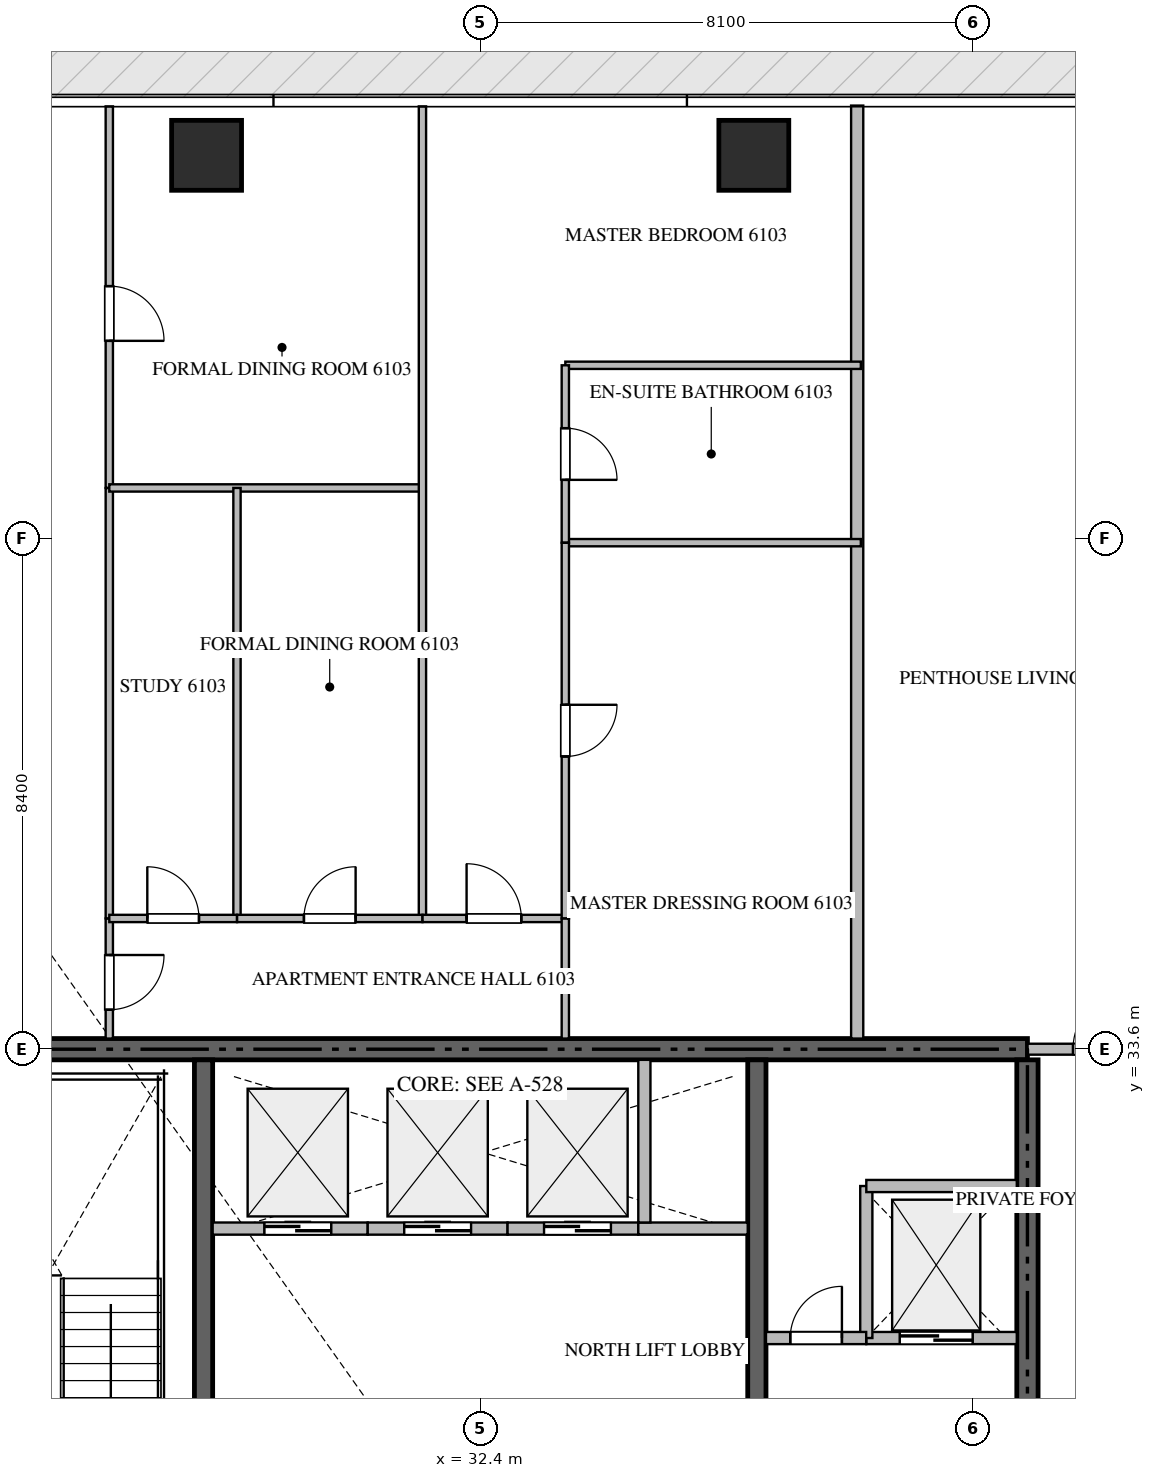
"""IFC4 building model, lengths in metres.
Left out: names, types, materials, properties, quantities, classifications, styles, units other than length and angle.
Written with IfcOpenShell. Run it as: python <this file> out.ifc"""

import sys

from ifc_helpers import new_model, si_unit, direction, frame, frame_2d, origin, origin_2d, place, context, subcontext, project, spatial, rectangle, extrude, source, transform, mapped, element, fill, save


model = new_model("IFC4")
c1 = context("Model", 3, precision=1e-05, world=origin(), true_north=direction((0.0, 1.0)))
c2 = subcontext(c1, "Body", "Model", "MODEL_VIEW")
j1 = project(units=[si_unit("LENGTHUNIT", "METRE"), si_unit("PLANEANGLEUNIT", "RADIAN")], contexts=[c1])
p1 = place(None, origin())
s1 = spatial("IfcSite", under=j1, at=p1, CompositionType="ELEMENT")
p2 = place(p1, origin())
s2 = spatial("IfcBuilding", under=s1, at=p2, CompositionType="ELEMENT")
p3 = place(p2, frame((0.0, 0.0, 245.1)))
s3 = spatial("IfcBuildingStorey", under=s2, at=p3, CompositionType="ELEMENT", Elevation=245.1)
p4 = place(p3, frame((41.4, 33.6, -0.26), z_axis=(0.0, 0.0, 1.0), x_axis=(-1.0, 0.0, 0.0)))
e1 = element("IfcWall", 1, at=p4, inside=s3, PredefinedType="SHEAR", context=c2, shape_type="SweptSolid", body=[
    extrude(rectangle(XDim=18.0, YDim=0.35, at=frame_2d((9.0, 0.0))), origin(), (0.0, 0.0, 1.0), 3.848),
])
p5 = place(p3, frame((41.4, 27.75, -0.26), z_axis=(0.0, 0.0, 1.0), x_axis=(0.0, 1.0, 0.0)))
e2 = element("IfcWall", 2, at=p5, inside=s3, PredefinedType="SHEAR", context=c2, shape_type="SweptSolid", body=[
    extrude(rectangle(XDim=5.675, YDim=0.35, at=frame_2d((2.837, 0.0))), origin(), (0.0, 0.0, 1.0), 3.848),
])
p6 = place(p3, frame((27.85, 23.55, -0.26), z_axis=(0.0, 0.0, 1.0), x_axis=(0.0, 1.0, 0.0)))
e3 = element("IfcWall", 3, at=p6, inside=s3, PredefinedType="SHEAR", context=c2, shape_type="SweptSolid", body=[
    extrude(rectangle(XDim=9.875, YDim=0.3, at=frame_2d((4.938, 0.0))), origin(), (0.0, 0.0, 1.0), 3.848),
])
p7 = place(p3, frame((36.95, 27.05, -0.26), z_axis=(0.0, 0.0, 1.0), x_axis=(0.0, 1.0, 0.0)))
e4 = element("IfcWall", 4, at=p7, inside=s3, PredefinedType="SHEAR", context=c2, shape_type="SweptSolid", body=[
    extrude(rectangle(XDim=6.375, YDim=0.3, at=frame_2d((3.188, 0.0))), origin(), (0.0, 0.0, 1.0), 3.848),
])
m1 = source(origin(), c2, "Body", "SweptSolid", [
    extrude(rectangle(XDim=1.15, YDim=1.15, at=origin_2d()), origin(), (0.0, 0.0, 1.0), 3.85),
])
for number, where, z_axis, x_axis in (
    (5, (27.9, 48.3, -0.26), (0.0, 0.0, 1.0), (1.0, 0.0, 0.0)),
    (6, (36.9, 48.3, -0.26), (0.0, 0.0, 1.0), (1.0, 0.0, 0.0)),
):
    element("IfcColumn", number, at=place(p3, frame(where, z_axis=z_axis, x_axis=x_axis)), inside=s3, PredefinedType="COLUMN", context=c2, shape_type="MappedRepresentation", body=[
        mapped(m1, transform((0.0, 0.0, 0.0), scale=1.0)),
    ])
p8 = place(p3, frame((38.75, 28.85, 0.0), z_axis=(0.0, 0.0, 1.0), x_axis=(1.0, 0.0, 0.0)))
e7 = element("IfcWall", 7, at=p8, inside=s3, PredefinedType="STANDARD", context=c2, shape_type="SweptSolid", body=[
    extrude(rectangle(XDim=2.475, YDim=0.2, at=frame_2d((1.238, 0.0))), origin(), (0.0, 0.0, 1.0), 3.59),
])
p9 = place(p8, frame((0.55, 0.0, 0.0)))
e8 = element("IfcOpeningElement", 8, at=p9, cuts=e7, PredefinedType="OPENING", context=c2, shape_type="SweptSolid", body=[
    extrude(rectangle(XDim=1.2, YDim=2.2, at=frame_2d((0.6, 1.1))), frame((0.0, 0.11, 0.0), z_axis=(0.0, -1.0, 0.0), x_axis=(1.0, 0.0, 0.0)), (0.0, 0.0, 1.0), 0.22),
])
p10 = place(p3, frame((28.0, 30.65, 0.0), z_axis=(0.0, 0.0, 1.0), x_axis=(1.0, 0.0, 0.0)))
e9 = element("IfcWall", 9, at=p10, inside=s3, PredefinedType="STANDARD", context=c2, shape_type="SweptSolid", body=[
    extrude(rectangle(XDim=2.55, YDim=0.2, at=frame_2d((1.275, 0.0))), origin(), (0.0, 0.0, 1.0), 3.59),
])
p11 = place(p10, frame((0.85, 0.0, 0.0)))
e10 = element("IfcOpeningElement", 10, at=p11, cuts=e9, PredefinedType="OPENING", context=c2, shape_type="SweptSolid", body=[
    extrude(rectangle(XDim=1.1, YDim=2.2, at=frame_2d((0.55, 1.1))), frame((0.0, 0.11, 0.0), z_axis=(0.0, -1.0, 0.0), x_axis=(1.0, 0.0, 0.0)), (0.0, 0.0, 1.0), 0.22),
])
p12 = place(p3, frame((30.55, 30.65, 0.0), z_axis=(0.0, 0.0, 1.0), x_axis=(1.0, 0.0, 0.0)))
e11 = element("IfcWall", 11, at=p12, inside=s3, PredefinedType="STANDARD", context=c2, shape_type="SweptSolid", body=[
    extrude(rectangle(XDim=2.3, YDim=0.2, at=frame_2d((1.15, 0.0))), origin(), (0.0, 0.0, 1.0), 3.59),
])
p13 = place(p12, frame((0.6, 0.0, 0.0)))
e12 = element("IfcOpeningElement", 12, at=p13, cuts=e11, PredefinedType="OPENING", context=c2, shape_type="SweptSolid", body=[
    extrude(rectangle(XDim=1.1, YDim=2.2, at=frame_2d((0.55, 1.1))), frame((0.0, 0.11, 0.0), z_axis=(0.0, -1.0, 0.0), x_axis=(1.0, 0.0, 0.0)), (0.0, 0.0, 1.0), 0.22),
])
p14 = place(p3, frame((32.85, 30.65, 0.0), z_axis=(0.0, 0.0, 1.0), x_axis=(1.0, 0.0, 0.0)))
e13 = element("IfcWall", 13, at=p14, inside=s3, PredefinedType="STANDARD", context=c2, shape_type="SweptSolid", body=[
    extrude(rectangle(XDim=2.15, YDim=0.2, at=frame_2d((1.075, 0.0))), origin(), (0.0, 0.0, 1.0), 3.59),
])
p15 = place(p14, frame((0.6, 0.0, 0.0)))
e14 = element("IfcOpeningElement", 14, at=p15, cuts=e13, PredefinedType="OPENING", context=c2, shape_type="SweptSolid", body=[
    extrude(rectangle(XDim=1.1, YDim=2.2, at=frame_2d((0.55, 1.1))), frame((0.0, 0.11, 0.0), z_axis=(0.0, -1.0, 0.0), x_axis=(1.0, 0.0, 0.0)), (0.0, 0.0, 1.0), 0.22),
])
p16 = place(p3, frame((35.0, 30.65, 0.0), z_axis=(0.0, 0.0, 1.0), x_axis=(1.0, 0.0, 0.0)))
e15 = element("IfcWall", 15, at=p16, inside=s3, PredefinedType="STANDARD", context=c2, shape_type="SweptSolid", body=[
    extrude(rectangle(XDim=1.8, YDim=0.2, at=frame_2d((0.9, 0.0))), origin(), (0.0, 0.0, 1.0), 3.59),
])
p17 = place(p3, frame((35.1, 30.75, 0.0), z_axis=(0.0, 0.0, 1.0), x_axis=(0.0, 1.0, 0.0)))
e16 = element("IfcWall", 16, at=p17, inside=s3, PredefinedType="STANDARD", context=c2, shape_type="SweptSolid", body=[
    extrude(rectangle(XDim=2.675, YDim=0.2, at=frame_2d((1.337, 0.0))), origin(), (0.0, 0.0, 1.0), 3.59),
])
p18 = place(p3, frame((38.75, 28.85, 0.0), z_axis=(0.0, 0.0, 1.0), x_axis=(0.0, 1.0, 0.0)))
e17 = element("IfcWall", 17, at=p18, inside=s3, PredefinedType="STANDARD", context=c2, shape_type="SweptSolid", body=[
    extrude(rectangle(XDim=2.5, YDim=0.2, at=frame_2d((1.25, 0.0))), origin(), (0.0, 0.0, 1.0), 3.59),
])
p19 = place(p3, frame((38.75, 31.35, 0.0), z_axis=(0.0, 0.0, 1.0), x_axis=(1.0, 0.0, 0.0)))
e18 = element("IfcWall", 18, at=p19, inside=s3, PredefinedType="STANDARD", context=c2, shape_type="SweptSolid", body=[
    extrude(rectangle(XDim=2.475, YDim=0.2, at=frame_2d((1.238, 0.0))), origin(), (0.0, 0.0, 1.0), 3.59),
])
p20 = place(p3, frame((37.1, 28.85, 0.0), z_axis=(0.0, 0.0, 1.0), x_axis=(1.0, 0.0, 0.0)))
e19 = element("IfcWall", 19, at=p20, inside=s3, PredefinedType="STANDARD", context=c2, shape_type="SweptSolid", body=[
    extrude(rectangle(XDim=1.648, YDim=0.2, at=frame_2d((0.824, 0.0))), origin(), (0.0, 0.0, 1.0), 3.59),
])
p21 = place(p20, frame((0.399, 0.0, 0.0)))
e20 = element("IfcOpeningElement", 20, at=p21, cuts=e19, PredefinedType="OPENING", context=c2, shape_type="SweptSolid", body=[
    extrude(rectangle(XDim=0.85, YDim=2.1, at=frame_2d((0.425, 1.05))), frame((0.0, 0.11, 0.0), z_axis=(0.0, -1.0, 0.0), x_axis=(1.0, 0.0, 0.0)), (0.0, 0.0, 1.0), 0.22),
])
p22 = place(p3, frame((38.6, 33.775, 0.0), z_axis=(0.0, 0.0, 1.0), x_axis=(0.0, 1.0, 0.0)))
e21 = element("IfcWall", 21, at=p22, inside=s3, PredefinedType="PARTITIONING", context=c2, shape_type="SweptSolid", body=[
    extrude(rectangle(XDim=15.343, YDim=0.2, at=frame_2d((7.671, 0.0))), origin(), (0.0, 0.0, 1.0), 3.59),
])
p23 = place(p3, frame((41.402, 33.6, 0.0), z_axis=(0.0, 0.0, 1.0), x_axis=(1.0, 0.0, 0.0)))
e22 = element("IfcWall", 22, at=p23, inside=s3, PredefinedType="PARTITIONING", context=c2, shape_type="SweptSolid", body=[
    extrude(rectangle(XDim=2.496, YDim=0.18, at=frame_2d((1.248, 0.0))), origin(), (0.0, 0.0, 1.0), 3.59),
])
p24 = place(p23, frame((0.748, 0.0, 0.0)))
e23 = element("IfcOpeningElement", 23, at=p24, cuts=e22, PredefinedType="OPENING", context=c2, shape_type="SweptSolid", body=[
    extrude(rectangle(XDim=1.0, YDim=2.15, at=frame_2d((0.5, 1.075))), frame((0.0, 0.1, 0.0), z_axis=(0.0, -1.0, 0.0), x_axis=(1.0, 0.0, 0.0)), (0.0, 0.0, 1.0), 0.2),
])
p25 = place(p3, frame((26.3, 35.75, 0.0), z_axis=(0.0, 0.0, 1.0), x_axis=(0.0, -1.0, 0.0)))
e24 = element("IfcWall", 24, at=p25, inside=s3, PredefinedType="PARTITIONING", context=c2, shape_type="SweptSolid", body=[
    extrude(rectangle(XDim=1.975, YDim=0.12, at=frame_2d((0.988, 0.0))), origin(), (0.0, 0.0, 1.0), 3.59),
])
p26 = place(p25, frame((0.601, 0.0, 0.0)))
e25 = element("IfcOpeningElement", 25, at=p26, cuts=e24, PredefinedType="OPENING", context=c2, shape_type="SweptSolid", body=[
    extrude(rectangle(XDim=0.9, YDim=2.1, at=frame_2d((0.45, 1.05))), frame((0.0, 0.07, 0.0), z_axis=(0.0, -1.0, 0.0), x_axis=(1.0, 0.0, 0.0)), (0.0, 0.0, 1.0), 0.14),
])
p27 = place(p3, frame((26.3, 49.105, 0.0), z_axis=(0.0, 0.0, 1.0), x_axis=(0.0, -1.0, 0.0)))
e26 = element("IfcWall", 26, at=p27, inside=s3, PredefinedType="PARTITIONING", context=c2, shape_type="SweptSolid", body=[
    extrude(rectangle(XDim=6.275, YDim=0.12, at=frame_2d((3.137, 0.0))), origin(), (0.0, 0.0, 1.0), 3.59),
])
p28 = place(p27, frame((2.956, 0.0, 0.0)))
e27 = element("IfcOpeningElement", 27, at=p28, cuts=e26, PredefinedType="OPENING", context=c2, shape_type="SweptSolid", body=[
    extrude(rectangle(XDim=0.9, YDim=2.1, at=frame_2d((0.45, 1.05))), frame((0.0, 0.07, 0.0), z_axis=(0.0, -1.0, 0.0), x_axis=(1.0, 0.0, 0.0)), (0.0, 0.0, 1.0), 0.14),
])
p29 = place(p3, frame((26.3, 42.828, 0.0), z_axis=(0.0, 0.0, 1.0), x_axis=(0.0, -1.0, 0.0)))
e28 = element("IfcWall", 28, at=p29, inside=s3, PredefinedType="PARTITIONING", context=c2, shape_type="SweptSolid", body=[
    extrude(rectangle(XDim=7.076, YDim=0.12, at=frame_2d((3.538, 0.0))), origin(), (0.0, 0.0, 1.0), 3.59),
])
p30 = place(p3, frame((26.3, 42.83, 0.0), z_axis=(0.0, 0.0, 1.0), x_axis=(1.0, 0.0, 0.0)))
e29 = element("IfcWall", 29, at=p30, inside=s3, PredefinedType="PARTITIONING", context=c2, shape_type="SweptSolid", body=[
    extrude(rectangle(XDim=5.15, YDim=0.12, at=frame_2d((2.575, 0.0))), origin(), (0.0, 0.0, 1.0), 3.59),
])
p31 = place(p3, frame((31.45, 49.105, 0.0), z_axis=(0.0, 0.0, 1.0), x_axis=(0.0, -1.0, 0.0)))
e30 = element("IfcWall", 30, at=p31, inside=s3, PredefinedType="PARTITIONING", context=c2, shape_type="SweptSolid", body=[
    extrude(rectangle(XDim=13.355, YDim=0.12, at=frame_2d((6.677, 0.0))), origin(), (0.0, 0.0, 1.0), 3.59),
])
p32 = place(p3, frame((28.4, 42.83, 0.0), z_axis=(0.0, 0.0, 1.0), x_axis=(0.0, -1.0, 0.0)))
e31 = element("IfcWall", 31, at=p32, inside=s3, PredefinedType="PARTITIONING", context=c2, shape_type="SweptSolid", body=[
    extrude(rectangle(XDim=7.08, YDim=0.12, at=frame_2d((3.54, 0.0))), origin(), (0.0, 0.0, 1.0), 3.59),
])
p33 = place(p3, frame((26.3, 35.75, 0.0), z_axis=(0.0, 0.0, 1.0), x_axis=(1.0, 0.0, 0.0)))
e32 = element("IfcWall", 32, at=p33, inside=s3, PredefinedType="PARTITIONING", context=c2, shape_type="SweptSolid", body=[
    extrude(rectangle(XDim=2.1, YDim=0.12, at=frame_2d((1.05, 0.0))), origin(), (0.0, 0.0, 1.0), 3.59),
])
p34 = place(p33, frame((0.625, 0.0, 0.0)))
e33 = element("IfcOpeningElement", 33, at=p34, cuts=e32, PredefinedType="OPENING", context=c2, shape_type="SweptSolid", body=[
    extrude(rectangle(XDim=0.85, YDim=2.1, at=frame_2d((0.425, 1.05))), frame((0.0, 0.07, 0.0), z_axis=(0.0, -1.0, 0.0), x_axis=(1.0, 0.0, 0.0)), (0.0, 0.0, 1.0), 0.14),
])
p35 = place(p3, frame((28.402, 35.75, 0.0), z_axis=(0.0, 0.0, 1.0), x_axis=(1.0, 0.0, 0.0)))
e34 = element("IfcWall", 34, at=p35, inside=s3, PredefinedType="PARTITIONING", context=c2, shape_type="SweptSolid", body=[
    extrude(rectangle(XDim=3.048, YDim=0.12, at=frame_2d((1.524, 0.0))), origin(), (0.0, 0.0, 1.0), 3.59),
])
p36 = place(p35, frame((1.099, 0.0, 0.0)))
e35 = element("IfcOpeningElement", 35, at=p36, cuts=e34, PredefinedType="OPENING", context=c2, shape_type="SweptSolid", body=[
    extrude(rectangle(XDim=0.85, YDim=2.1, at=frame_2d((0.425, 1.05))), frame((0.0, 0.07, 0.0), z_axis=(0.0, -1.0, 0.0), x_axis=(1.0, 0.0, 0.0)), (0.0, 0.0, 1.0), 0.14),
])
p37 = place(p3, frame((31.452, 35.75, 0.0), z_axis=(0.0, 0.0, 1.0), x_axis=(1.0, 0.0, 0.0)))
e36 = element("IfcWall", 36, at=p37, inside=s3, PredefinedType="PARTITIONING", context=c2, shape_type="SweptSolid", body=[
    extrude(rectangle(XDim=2.348, YDim=0.12, at=frame_2d((1.174, 0.0))), origin(), (0.0, 0.0, 1.0), 3.59),
])
p38 = place(p37, frame((0.724, 0.0, 0.0)))
e37 = element("IfcOpeningElement", 37, at=p38, cuts=e36, PredefinedType="OPENING", context=c2, shape_type="SweptSolid", body=[
    extrude(rectangle(XDim=0.9, YDim=2.1, at=frame_2d((0.45, 1.05))), frame((0.0, 0.07, 0.0), z_axis=(0.0, -1.0, 0.0), x_axis=(1.0, 0.0, 0.0)), (0.0, 0.0, 1.0), 0.14),
])
for number, where, z_axis, x_axis in (
    (38, (33.8, 44.847, 0.0), (0.0, 0.0, 1.0), (1.0, 0.0, 0.0)),
    (39, (33.8, 41.93, 0.0), (0.0, 0.0, 1.0), (1.0, 0.0, 0.0)),
):
    element("IfcWall", number, at=place(p3, frame(where, z_axis=z_axis, x_axis=x_axis)), inside=s3, PredefinedType="PARTITIONING", context=c2, shape_type="SweptSolid", body=[
        extrude(rectangle(XDim=4.86, YDim=0.12, at=frame_2d((2.43, 0.0))), origin(), (0.0, 0.0, 1.0), 3.59),
    ])
p39 = place(p3, frame((33.8, 44.847, 0.0), z_axis=(0.0, 0.0, 1.0), x_axis=(0.0, -1.0, 0.0)))
e40 = element("IfcWall", 40, at=p39, inside=s3, PredefinedType="PARTITIONING", context=c2, shape_type="SweptSolid", body=[
    extrude(rectangle(XDim=2.917, YDim=0.12, at=frame_2d((1.458, 0.0))), origin(), (0.0, 0.0, 1.0), 3.59),
])
p40 = place(p39, frame((1.034, 0.0, 0.0)))
e41 = element("IfcOpeningElement", 41, at=p40, cuts=e40, PredefinedType="OPENING", context=c2, shape_type="SweptSolid", body=[
    extrude(rectangle(XDim=0.85, YDim=2.1, at=frame_2d((0.425, 1.05))), frame((0.0, 0.07, 0.0), z_axis=(0.0, -1.0, 0.0), x_axis=(1.0, 0.0, 0.0)), (0.0, 0.0, 1.0), 0.14),
])
p41 = place(p3, frame((33.8, 41.928, 0.0), z_axis=(0.0, 0.0, 1.0), x_axis=(0.0, -1.0, 0.0)))
e42 = element("IfcWall", 42, at=p41, inside=s3, PredefinedType="PARTITIONING", context=c2, shape_type="SweptSolid", body=[
    extrude(rectangle(XDim=6.178, YDim=0.12, at=frame_2d((3.089, 0.0))), origin(), (0.0, 0.0, 1.0), 3.59),
])
p42 = place(p41, frame((2.664, 0.0, 0.0)))
e43 = element("IfcOpeningElement", 43, at=p42, cuts=e42, PredefinedType="OPENING", context=c2, shape_type="SweptSolid", body=[
    extrude(rectangle(XDim=0.85, YDim=2.1, at=frame_2d((0.425, 1.05))), frame((0.0, 0.07, 0.0), z_axis=(0.0, -1.0, 0.0), x_axis=(1.0, 0.0, 0.0)), (0.0, 0.0, 1.0), 0.14),
])
p43 = place(p3, frame((33.8, 35.748, 0.0), z_axis=(0.0, 0.0, 1.0), x_axis=(0.0, -1.0, 0.0)))
e44 = element("IfcWall", 44, at=p43, inside=s3, PredefinedType="PARTITIONING", context=c2, shape_type="SweptSolid", body=[
    extrude(rectangle(XDim=1.973, YDim=0.12, at=frame_2d((0.987, 0.0))), origin(), (0.0, 0.0, 1.0), 3.59),
])
m2 = source(origin(), c2, "Body", "SweptSolid", [
    extrude(rectangle(XDim=1.2, YDim=2.2, at=frame_2d((0.6, 1.1))), frame((0.0, 0.025, 0.0), z_axis=(0.0, -1.0, 0.0), x_axis=(1.0, 0.0, 0.0)), (0.0, 0.0, 1.0), 0.05),
])
p44 = place(p9, origin())
e45 = element("IfcDoor", 45, at=p44, inside=s3, OperationType="DOUBLE_DOOR_SLIDING", PredefinedType="DOOR", context=c2, shape_type="MappedRepresentation", body=[
    mapped(m2, transform((0.0, 0.0, 0.0), scale=1.0)),
])
fill(e8, e45)
m3 = source(origin(), c2, "Body", "SweptSolid", [
    extrude(rectangle(XDim=1.1, YDim=2.2, at=frame_2d((0.55, 1.1))), frame((0.0, 0.025, 0.0), z_axis=(0.0, -1.0, 0.0), x_axis=(1.0, 0.0, 0.0)), (0.0, 0.0, 1.0), 0.05),
])
p45 = place(p11, origin())
e46 = element("IfcDoor", 46, at=p45, inside=s3, OperationType="DOUBLE_DOOR_SLIDING", PredefinedType="DOOR", context=c2, shape_type="MappedRepresentation", body=[
    mapped(m3, transform((0.0, 0.0, 0.0), scale=1.0)),
])
fill(e10, e46)
p46 = place(p13, origin())
e47 = element("IfcDoor", 47, at=p46, inside=s3, OperationType="DOUBLE_DOOR_SLIDING", PredefinedType="DOOR", context=c2, shape_type="MappedRepresentation", body=[
    mapped(m3, transform((0.0, 0.0, 0.0), scale=1.0)),
])
fill(e12, e47)
p47 = place(p15, origin())
e48 = element("IfcDoor", 48, at=p47, inside=s3, OperationType="DOUBLE_DOOR_SLIDING", PredefinedType="DOOR", context=c2, shape_type="MappedRepresentation", body=[
    mapped(m3, transform((0.0, 0.0, 0.0), scale=1.0)),
])
fill(e14, e48)
m4 = source(origin(), c2, "Body", "SweptSolid", [
    extrude(rectangle(XDim=0.85, YDim=2.1, at=frame_2d((0.425, 1.05))), frame((0.0, 0.025, 0.0), z_axis=(0.0, -1.0, 0.0), x_axis=(1.0, 0.0, 0.0)), (0.0, 0.0, 1.0), 0.05),
])
p48 = place(p21, origin())
e49 = element("IfcDoor", 49, at=p48, inside=s3, OperationType="SINGLE_SWING_RIGHT", PredefinedType="DOOR", context=c2, shape_type="MappedRepresentation", body=[
    mapped(m4, transform((0.0, 0.0, 0.0), scale=1.0)),
])
fill(e20, e49)
m5 = source(origin(), c2, "Body", "SweptSolid", [
    extrude(rectangle(XDim=1.0, YDim=2.15, at=frame_2d((0.5, 1.075))), frame((0.0, 0.025, 0.0), z_axis=(0.0, -1.0, 0.0), x_axis=(1.0, 0.0, 0.0)), (0.0, 0.0, 1.0), 0.05),
])
p49 = place(p24, origin())
e50 = element("IfcDoor", 50, at=p49, inside=s3, OperationType="SINGLE_SWING_RIGHT", PredefinedType="DOOR", context=c2, shape_type="MappedRepresentation", body=[
    mapped(m5, transform((0.0, 0.0, 0.0), scale=1.0)),
])
fill(e23, e50)
m6 = source(origin(), c2, "Body", "SweptSolid", [
    extrude(rectangle(XDim=0.9, YDim=2.1, at=frame_2d((0.45, 1.05))), frame((0.0, 0.025, 0.0), z_axis=(0.0, -1.0, 0.0), x_axis=(1.0, 0.0, 0.0)), (0.0, 0.0, 1.0), 0.05),
])
p50 = place(p26, origin())
e51 = element("IfcDoor", 51, at=p50, inside=s3, OperationType="SINGLE_SWING_LEFT", PredefinedType="DOOR", context=c2, shape_type="MappedRepresentation", body=[
    mapped(m6, transform((0.0, 0.0, 0.0), scale=1.0)),
])
fill(e25, e51)
p51 = place(p28, origin())
e52 = element("IfcDoor", 52, at=p51, inside=s3, OperationType="SINGLE_SWING_RIGHT", PredefinedType="DOOR", context=c2, shape_type="MappedRepresentation", body=[
    mapped(m6, transform((0.0, 0.0, 0.0), scale=1.0)),
])
fill(e27, e52)
p52 = place(p34, origin())
e53 = element("IfcDoor", 53, at=p52, inside=s3, OperationType="SINGLE_SWING_LEFT", PredefinedType="DOOR", context=c2, shape_type="MappedRepresentation", body=[
    mapped(m4, transform((0.0, 0.0, 0.0), scale=1.0)),
])
fill(e33, e53)
p53 = place(p36, origin())
e54 = element("IfcDoor", 54, at=p53, inside=s3, OperationType="SINGLE_SWING_RIGHT", PredefinedType="DOOR", context=c2, shape_type="MappedRepresentation", body=[
    mapped(m4, transform((0.0, 0.0, 0.0), scale=1.0)),
])
fill(e35, e54)
p54 = place(p38, origin())
e55 = element("IfcDoor", 55, at=p54, inside=s3, OperationType="SINGLE_SWING_LEFT", PredefinedType="DOOR", context=c2, shape_type="MappedRepresentation", body=[
    mapped(m6, transform((0.0, 0.0, 0.0), scale=1.0)),
])
fill(e37, e55)
p55 = place(p40, origin())
e56 = element("IfcDoor", 56, at=p55, inside=s3, OperationType="SINGLE_SWING_RIGHT", PredefinedType="DOOR", context=c2, shape_type="MappedRepresentation", body=[
    mapped(m4, transform((0.0, 0.0, 0.0), scale=1.0)),
])
fill(e41, e56)
p56 = place(p42, origin())
e57 = element("IfcDoor", 57, at=p56, inside=s3, OperationType="SINGLE_SWING_LEFT", PredefinedType="DOOR", context=c2, shape_type="MappedRepresentation", body=[
    mapped(m4, transform((0.0, 0.0, 0.0), scale=1.0)),
])
fill(e43, e57)
save(model, sys.argv[1])
